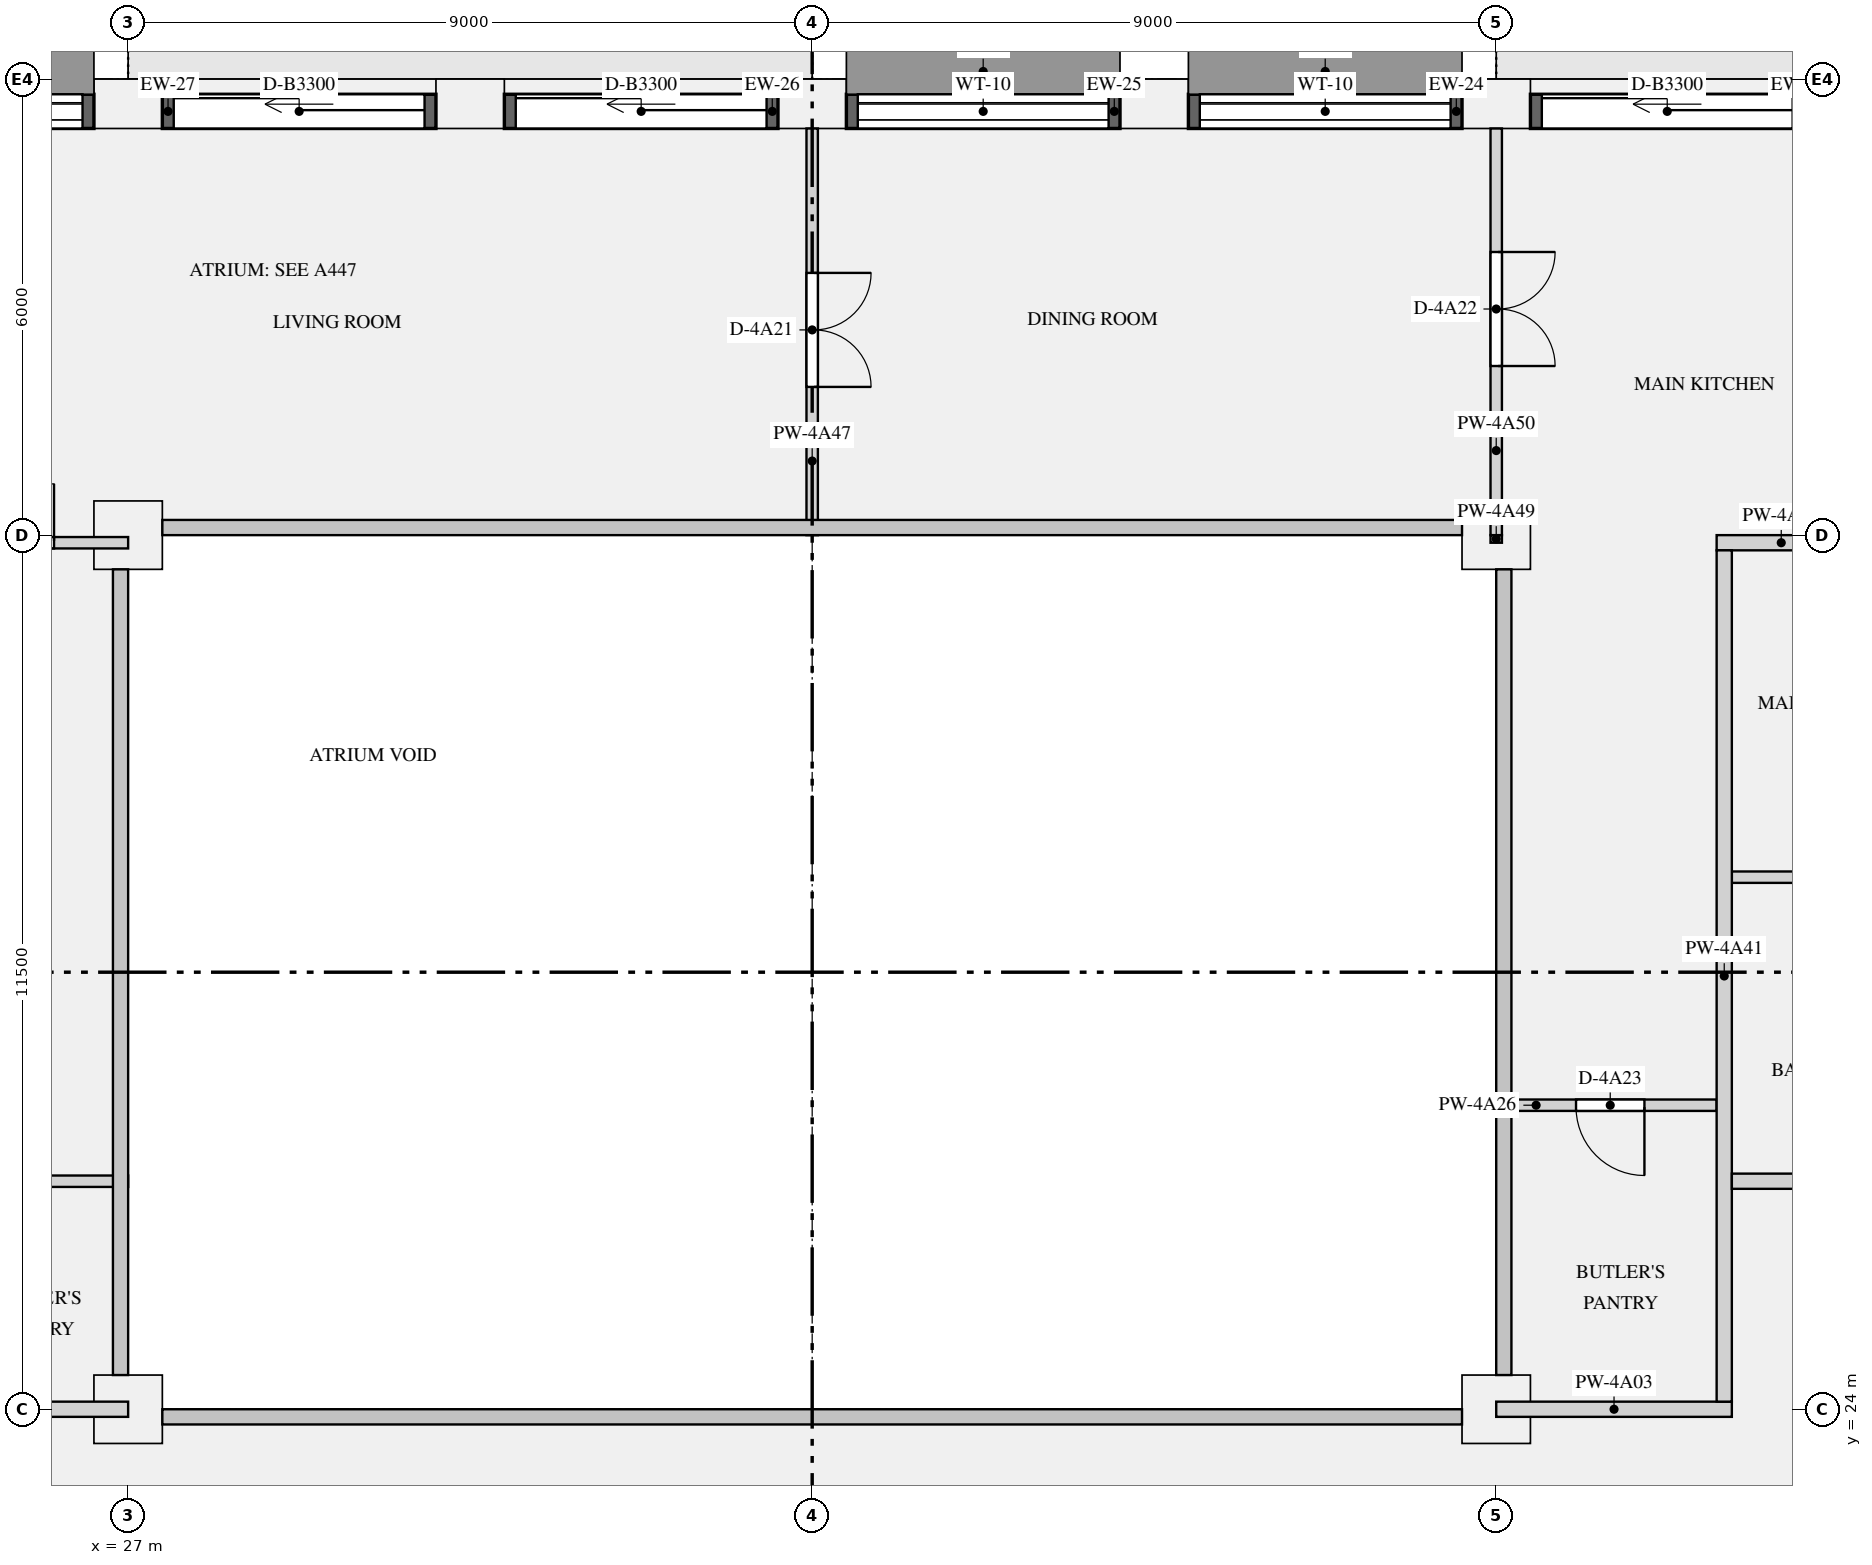
"""IFC4 building model, lengths in metres.
Left out: names, types, materials, properties, quantities, classifications, styles, units other than length and angle.
Written with IfcOpenShell. Run it as: python <this file> out.ifc"""

import sys

from ifc_helpers import new_model, si_unit, direction, frame, frame_2d, origin, origin_2d, place, context, subcontext, project, spatial, rectangle, extrude, element, fill, save


model = new_model("IFC4")
c1 = context("Model", 3, precision=1e-05, world=origin(), true_north=direction((0.0, 1.0)))
c2 = subcontext(c1, "Body", "Model", "MODEL_VIEW")
j1 = project(units=[si_unit("LENGTHUNIT", "METRE"), si_unit("PLANEANGLEUNIT", "RADIAN")], contexts=[c1])
p1 = place(None, origin())
s1 = spatial("IfcSite", under=j1, at=p1, CompositionType="ELEMENT")
p2 = place(p1, origin())
s2 = spatial("IfcBuilding", under=s1, at=p2, CompositionType="ELEMENT")
p3 = place(p2, frame((0.0, 0.0, 198.0)))
s3 = spatial("IfcBuildingStorey", under=s2, at=p3, CompositionType="ELEMENT", Elevation=198.0)
for number, where, z_axis, x_axis in (
    (1, (45.0, 41.175, 0.0), (0.0, 0.0, 1.0), (-1.0, 0.0, 0.0)),
    (2, (40.5, 41.175, 0.0), (0.0, 0.0, 1.0), (-1.0, 0.0, 0.0)),
    (3, (36.0, 41.175, 0.0), (0.0, 0.0, 1.0), (-1.0, 0.0, 0.0)),
    (4, (31.5, 41.175, 0.0), (0.0, 0.0, 1.0), (-1.0, 0.0, 0.0)),
    (5, (27.0, 41.175, 0.0), (0.0, 0.0, 1.0), (-1.0, 0.0, 0.0)),
):
    element("IfcColumn", number, at=place(p3, frame(where, z_axis=z_axis, x_axis=x_axis)), inside=s3, PredefinedType="USERDEFINED", context=c2, shape_type="SweptSolid", body=[
        extrude(rectangle(XDim=0.9, YDim=0.65, at=origin_2d()), origin(), (0.0, 0.0, 1.0), 3.15),
    ])
for number, where, z_axis, x_axis in (
    (6, (27.0, 24.0, 0.0), (0.0, 0.0, 1.0), (1.0, 0.0, 0.0)),
    (7, (45.0, 24.0, 0.0), (0.0, 0.0, 1.0), (1.0, 0.0, 0.0)),
    (8, (27.0, 35.5, 0.0), (0.0, 0.0, 1.0), (1.0, 0.0, 0.0)),
    (9, (45.0, 35.5, 0.0), (0.0, 0.0, 1.0), (1.0, 0.0, 0.0)),
):
    element("IfcColumn", number, at=place(p3, frame(where, z_axis=z_axis, x_axis=x_axis)), inside=s3, PredefinedType="COLUMN", context=c2, shape_type="SweptSolid", body=[
        extrude(rectangle(XDim=0.9, YDim=0.9, at=origin_2d()), origin(), (0.0, 0.0, 1.0), 3.15),
    ])
p4 = place(p3, frame((49.05, 41.075, 0.0), z_axis=(0.0, 0.0, 1.0), x_axis=(-1.0, 0.0, 0.0)))
e10 = element("IfcWall", 10, at=p4, inside=s3, PredefinedType="SOLIDWALL", context=c2, shape_type="SweptSolid", body=[
    extrude(rectangle(XDim=3.6, YDim=0.45, at=frame_2d((1.8, 0.0))), origin(), (0.0, 0.0, 1.0), 2.83),
])
p5 = place(p4, frame((0.15, 0.0, 0.0)))
e11 = element("IfcOpeningElement", 11, at=p5, cuts=e10, PredefinedType="OPENING", context=c2, shape_type="SweptSolid", body=[
    extrude(rectangle(XDim=3.3, YDim=2.3, at=frame_2d((1.65, 1.15))), frame((0.0, 0.235, 0.0), z_axis=(0.0, -1.0, 0.0), x_axis=(1.0, 0.0, 0.0)), (0.0, 0.0, 1.0), 0.47),
])
p6 = place(p3, frame((44.55, 41.075, 0.9), z_axis=(0.0, 0.0, 1.0), x_axis=(-1.0, 0.0, 0.0)))
e12 = element("IfcWall", 12, at=p6, inside=s3, PredefinedType="SOLIDWALL", context=c2, shape_type="SweptSolid", body=[
    extrude(rectangle(XDim=3.6, YDim=0.45, at=frame_2d((1.8, 0.0))), origin(), (0.0, 0.0, 1.0), 1.93),
])
p7 = place(p6, frame((0.15, 0.0, 0.15)))
e13 = element("IfcOpeningElement", 13, at=p7, cuts=e12, PredefinedType="OPENING", context=c2, shape_type="SweptSolid", body=[
    extrude(rectangle(XDim=3.3, YDim=1.5, at=frame_2d((1.65, 0.75))), frame((0.0, 0.235, 0.0), z_axis=(0.0, -1.0, 0.0), x_axis=(1.0, 0.0, 0.0)), (0.0, 0.0, 1.0), 0.47),
])
p8 = place(p3, frame((40.05, 41.075, 0.9), z_axis=(0.0, 0.0, 1.0), x_axis=(-1.0, 0.0, 0.0)))
e14 = element("IfcWall", 14, at=p8, inside=s3, PredefinedType="SOLIDWALL", context=c2, shape_type="SweptSolid", body=[
    extrude(rectangle(XDim=3.6, YDim=0.45, at=frame_2d((1.8, 0.0))), origin(), (0.0, 0.0, 1.0), 1.93),
])
p9 = place(p8, frame((0.15, 0.0, 0.15)))
e15 = element("IfcOpeningElement", 15, at=p9, cuts=e14, PredefinedType="OPENING", context=c2, shape_type="SweptSolid", body=[
    extrude(rectangle(XDim=3.3, YDim=1.5, at=frame_2d((1.65, 0.75))), frame((0.0, 0.235, 0.0), z_axis=(0.0, -1.0, 0.0), x_axis=(1.0, 0.0, 0.0)), (0.0, 0.0, 1.0), 0.47),
])
p10 = place(p3, frame((35.55, 41.075, 0.0), z_axis=(0.0, 0.0, 1.0), x_axis=(-1.0, 0.0, 0.0)))
e16 = element("IfcWall", 16, at=p10, inside=s3, PredefinedType="SOLIDWALL", context=c2, shape_type="SweptSolid", body=[
    extrude(rectangle(XDim=3.6, YDim=0.45, at=frame_2d((1.8, 0.0))), origin(), (0.0, 0.0, 1.0), 2.83),
])
p11 = place(p10, frame((0.15, 0.0, 0.0)))
e17 = element("IfcOpeningElement", 17, at=p11, cuts=e16, PredefinedType="OPENING", context=c2, shape_type="SweptSolid", body=[
    extrude(rectangle(XDim=3.3, YDim=2.3, at=frame_2d((1.65, 1.15))), frame((0.0, 0.235, 0.0), z_axis=(0.0, -1.0, 0.0), x_axis=(1.0, 0.0, 0.0)), (0.0, 0.0, 1.0), 0.47),
])
p12 = place(p3, frame((31.05, 41.075, 0.0), z_axis=(0.0, 0.0, 1.0), x_axis=(-1.0, 0.0, 0.0)))
e18 = element("IfcWall", 18, at=p12, inside=s3, PredefinedType="SOLIDWALL", context=c2, shape_type="SweptSolid", body=[
    extrude(rectangle(XDim=3.6, YDim=0.45, at=frame_2d((1.8, 0.0))), origin(), (0.0, 0.0, 1.0), 2.83),
])
p13 = place(p12, frame((0.15, 0.0, 0.0)))
e19 = element("IfcOpeningElement", 19, at=p13, cuts=e18, PredefinedType="OPENING", context=c2, shape_type="SweptSolid", body=[
    extrude(rectangle(XDim=3.3, YDim=2.3, at=frame_2d((1.65, 1.15))), frame((0.0, 0.235, 0.0), z_axis=(0.0, -1.0, 0.0), x_axis=(1.0, 0.0, 0.0)), (0.0, 0.0, 1.0), 0.47),
])
p14 = place(p3, frame((26.55, 41.075, 0.9), z_axis=(0.0, 0.0, 1.0), x_axis=(-1.0, 0.0, 0.0)))
e20 = element("IfcWall", 20, at=p14, inside=s3, PredefinedType="SOLIDWALL", context=c2, shape_type="SweptSolid", body=[
    extrude(rectangle(XDim=3.6, YDim=0.45, at=frame_2d((1.8, 0.0))), origin(), (0.0, 0.0, 1.0), 1.93),
])
p15 = place(p14, frame((0.15, 0.0, 0.15)))
e21 = element("IfcOpeningElement", 21, at=p15, cuts=e20, PredefinedType="OPENING", context=c2, shape_type="SweptSolid", body=[
    extrude(rectangle(XDim=3.3, YDim=1.5, at=frame_2d((1.65, 0.75))), frame((0.0, 0.235, 0.0), z_axis=(0.0, -1.0, 0.0), x_axis=(1.0, 0.0, 0.0)), (0.0, 0.0, 1.0), 0.47),
])
for number, where, z_axis, x_axis in (
    (22, (23.9, 24.0, 0.0), (0.0, 0.0, 1.0), (1.0, 0.0, 0.0)),
    (23, (45.0, 24.0, 0.0), (0.0, 0.0, 1.0), (1.0, 0.0, 0.0)),
):
    element("IfcWall", number, at=place(p3, frame(where, z_axis=z_axis, x_axis=x_axis)), inside=s3, PredefinedType="PARTITIONING", context=c2, shape_type="SweptSolid", body=[
        extrude(rectangle(XDim=3.1, YDim=0.2, at=frame_2d((1.55, 0.0))), origin(), (0.0, 0.0, 1.0), 2.83),
    ])
p16 = place(p3, frame((23.925, 27.0, 0.0), z_axis=(0.0, 0.0, 1.0), x_axis=(1.0, 0.0, 0.0)))
e24 = element("IfcWall", 24, at=p16, inside=s3, PredefinedType="PARTITIONING", context=c2, shape_type="SweptSolid", body=[
    extrude(rectangle(XDim=3.075, YDim=0.15, at=frame_2d((1.538, 0.0))), origin(), (0.0, 0.0, 1.0), 2.83),
])
p17 = place(p16, frame((1.125, 0.0, 0.0)))
e25 = element("IfcOpeningElement", 25, at=p17, cuts=e24, PredefinedType="OPENING", context=c2, shape_type="SweptSolid", body=[
    extrude(rectangle(XDim=0.9, YDim=2.1, at=frame_2d((0.45, 1.05))), frame((0.0, 0.085, 0.0), z_axis=(0.0, -1.0, 0.0), x_axis=(1.0, 0.0, 0.0)), (0.0, 0.0, 1.0), 0.17),
])
p18 = place(p3, frame((48.1, 27.0, 0.0), z_axis=(0.0, 0.0, 1.0), x_axis=(1.0, 0.0, 0.0)))
e26 = element("IfcWall", 26, at=p18, inside=s3, PredefinedType="PARTITIONING", context=c2, shape_type="SweptSolid", body=[
    extrude(rectangle(XDim=6.8, YDim=0.2, at=frame_2d((3.4, 0.0))), origin(), (0.0, 0.0, 1.0), 2.83),
])
p19 = place(p18, frame((4.85, 0.0, 0.0)))
e27 = element("IfcOpeningElement", 27, at=p19, cuts=e26, PredefinedType="OPENING", context=c2, shape_type="SweptSolid", body=[
    extrude(rectangle(XDim=1.1, YDim=2.1, at=frame_2d((0.55, 1.05))), frame((0.0, 0.11, 0.0), z_axis=(0.0, -1.0, 0.0), x_axis=(1.0, 0.0, 0.0)), (0.0, 0.0, 1.0), 0.22),
])
p20 = place(p3, frame((15.8, 35.4, 0.0), z_axis=(0.0, 0.0, 1.0), x_axis=(1.0, 0.0, 0.0)))
e28 = element("IfcWall", 28, at=p20, inside=s3, PredefinedType="PARTITIONING", context=c2, shape_type="SweptSolid", body=[
    extrude(rectangle(XDim=11.2, YDim=0.15, at=frame_2d((5.6, 0.0))), origin(), (0.0, 0.0, 1.0), 2.83),
])
p21 = place(p20, frame((0.425, 0.0, 0.0)))
e29 = element("IfcOpeningElement", 29, at=p21, cuts=e28, PredefinedType="OPENING", context=c2, shape_type="SweptSolid", body=[
    extrude(rectangle(XDim=0.9, YDim=2.1, at=frame_2d((0.45, 1.05))), frame((0.0, 0.085, 0.0), z_axis=(0.0, -1.0, 0.0), x_axis=(1.0, 0.0, 0.0)), (0.0, 0.0, 1.0), 0.17),
])
p22 = place(p20, frame((4.225, 0.0, 0.0)))
e30 = element("IfcOpeningElement", 30, at=p22, cuts=e28, PredefinedType="OPENING", context=c2, shape_type="SweptSolid", body=[
    extrude(rectangle(XDim=0.9, YDim=2.1, at=frame_2d((0.45, 1.05))), frame((0.0, 0.085, 0.0), z_axis=(0.0, -1.0, 0.0), x_axis=(1.0, 0.0, 0.0)), (0.0, 0.0, 1.0), 0.17),
])
p23 = place(p20, frame((8.725, 0.0, 0.0)))
e31 = element("IfcOpeningElement", 31, at=p23, cuts=e28, PredefinedType="OPENING", context=c2, shape_type="SweptSolid", body=[
    extrude(rectangle(XDim=1.5, YDim=2.1, at=frame_2d((0.75, 1.05))), frame((0.0, 0.085, 0.0), z_axis=(0.0, -1.0, 0.0), x_axis=(1.0, 0.0, 0.0)), (0.0, 0.0, 1.0), 0.17),
])
p24 = place(p3, frame((47.9, 35.4, 0.0), z_axis=(0.0, 0.0, 1.0), x_axis=(1.0, 0.0, 0.0)))
e32 = element("IfcWall", 32, at=p24, inside=s3, PredefinedType="PARTITIONING", context=c2, shape_type="SweptSolid", body=[
    extrude(rectangle(XDim=1.7, YDim=0.2, at=frame_2d((0.85, 0.0))), origin(), (0.0, 0.0, 1.0), 2.83),
])
p25 = place(p3, frame((45.0, 28.0, 0.0), z_axis=(0.0, 0.0, 1.0), x_axis=(1.0, 0.0, 0.0)))
e33 = element("IfcWall", 33, at=p25, inside=s3, PredefinedType="PARTITIONING", context=c2, shape_type="SweptSolid", body=[
    extrude(rectangle(XDim=2.9, YDim=0.15, at=frame_2d((1.45, 0.0))), origin(), (0.0, 0.0, 1.0), 2.83),
])
p26 = place(p25, frame((1.05, 0.0, 0.0)))
e34 = element("IfcOpeningElement", 34, at=p26, cuts=e33, PredefinedType="OPENING", context=c2, shape_type="SweptSolid", body=[
    extrude(rectangle(XDim=0.9, YDim=2.1, at=frame_2d((0.45, 1.05))), frame((0.0, 0.085, 0.0), z_axis=(0.0, -1.0, 0.0), x_axis=(1.0, 0.0, 0.0)), (0.0, 0.0, 1.0), 0.17),
])
p27 = place(p3, frame((48.1, 31.0, 0.0), z_axis=(0.0, 0.0, 1.0), x_axis=(1.0, 0.0, 0.0)))
e35 = element("IfcWall", 35, at=p27, inside=s3, PredefinedType="PARTITIONING", context=c2, shape_type="SweptSolid", body=[
    extrude(rectangle(XDim=3.325, YDim=0.15, at=frame_2d((1.663, 0.0))), origin(), (0.0, 0.0, 1.0), 2.83),
])
p28 = place(p3, frame((48.0, 24.1, 0.0), z_axis=(0.0, 0.0, 1.0), x_axis=(0.0, 1.0, 0.0)))
e36 = element("IfcWall", 36, at=p28, inside=s3, PredefinedType="PARTITIONING", context=c2, shape_type="SweptSolid", body=[
    extrude(rectangle(XDim=11.2, YDim=0.2, at=frame_2d((5.6, 0.0))), origin(), (0.0, 0.0, 1.0), 2.83),
])
p29 = place(p3, frame((36.0, 35.5, 0.0), z_axis=(0.0, 0.0, 1.0), x_axis=(0.0, 1.0, 0.0)))
e37 = element("IfcWall", 37, at=p29, inside=s3, PredefinedType="PARTITIONING", context=c2, shape_type="SweptSolid", body=[
    extrude(rectangle(XDim=5.35, YDim=0.15, at=frame_2d((2.675, 0.0))), origin(), (0.0, 0.0, 1.0), 2.83),
])
p30 = place(p29, frame((1.95, 0.0, 0.0)))
e38 = element("IfcOpeningElement", 38, at=p30, cuts=e37, PredefinedType="OPENING", context=c2, shape_type="SweptSolid", body=[
    extrude(rectangle(XDim=1.5, YDim=2.1, at=frame_2d((0.75, 1.05))), frame((0.0, 0.085, 0.0), z_axis=(0.0, -1.0, 0.0), x_axis=(1.0, 0.0, 0.0)), (0.0, 0.0, 1.0), 0.17),
])
p31 = place(p3, frame((45.0, 35.4, 0.0), z_axis=(0.0, 0.0, 1.0), x_axis=(0.0, 1.0, 0.0)))
e39 = element("IfcWall", 39, at=p31, inside=s3, PredefinedType="PARTITIONING", context=c2, shape_type="SweptSolid", body=[
    extrude(rectangle(XDim=0.1, YDim=0.15, at=frame_2d((0.05, 0.0))), origin(), (0.0, 0.0, 1.0), 2.83),
])
p32 = place(p3, frame((45.0, 35.5, 0.0), z_axis=(0.0, 0.0, 1.0), x_axis=(0.0, 1.0, 0.0)))
e40 = element("IfcWall", 40, at=p32, inside=s3, PredefinedType="PARTITIONING", context=c2, shape_type="SweptSolid", body=[
    extrude(rectangle(XDim=5.35, YDim=0.15, at=frame_2d((2.675, 0.0))), origin(), (0.0, 0.0, 1.0), 2.83),
])
p33 = place(p32, frame((2.225, 0.0, 0.0)))
e41 = element("IfcOpeningElement", 41, at=p33, cuts=e40, PredefinedType="OPENING", context=c2, shape_type="SweptSolid", body=[
    extrude(rectangle(XDim=1.5, YDim=2.1, at=frame_2d((0.75, 1.05))), frame((0.0, 0.085, 0.0), z_axis=(0.0, -1.0, 0.0), x_axis=(1.0, 0.0, 0.0)), (0.0, 0.0, 1.0), 0.17),
])
p34 = place(p5, origin())
e42 = element("IfcDoor", 42, at=p34, inside=s3, OperationType="SLIDING_TO_LEFT", PredefinedType="DOOR", context=c2, shape_type="SweptSolid", body=[
    extrude(rectangle(XDim=3.3, YDim=2.3, at=frame_2d((1.65, 1.15))), frame((0.0, -0.07, 0.0), z_axis=(0.0, -1.0, 0.0), x_axis=(1.0, 0.0, 0.0)), (0.0, 0.0, 1.0), 0.05),
])
fill(e11, e42)
p35 = place(p7, origin())
e43 = element("IfcWindow", 43, at=p35, inside=s3, PartitioningType="SINGLE_PANEL", PredefinedType="WINDOW", context=c2, shape_type="SweptSolid", body=[
    extrude(rectangle(XDim=3.3, YDim=1.5, at=frame_2d((1.65, 0.75))), frame((0.0, -0.065, 0.0), z_axis=(0.0, -1.0, 0.0), x_axis=(1.0, 0.0, 0.0)), (0.0, 0.0, 1.0), 0.06),
])
fill(e13, e43)
p36 = place(p9, origin())
e44 = element("IfcWindow", 44, at=p36, inside=s3, PartitioningType="SINGLE_PANEL", PredefinedType="WINDOW", context=c2, shape_type="SweptSolid", body=[
    extrude(rectangle(XDim=3.3, YDim=1.5, at=frame_2d((1.65, 0.75))), frame((0.0, -0.065, 0.0), z_axis=(0.0, -1.0, 0.0), x_axis=(1.0, 0.0, 0.0)), (0.0, 0.0, 1.0), 0.06),
])
fill(e15, e44)
p37 = place(p11, origin())
e45 = element("IfcDoor", 45, at=p37, inside=s3, OperationType="SLIDING_TO_LEFT", PredefinedType="DOOR", context=c2, shape_type="SweptSolid", body=[
    extrude(rectangle(XDim=3.3, YDim=2.3, at=frame_2d((1.65, 1.15))), frame((0.0, -0.07, 0.0), z_axis=(0.0, -1.0, 0.0), x_axis=(1.0, 0.0, 0.0)), (0.0, 0.0, 1.0), 0.05),
])
fill(e17, e45)
p38 = place(p13, origin())
e46 = element("IfcDoor", 46, at=p38, inside=s3, OperationType="SLIDING_TO_LEFT", PredefinedType="DOOR", context=c2, shape_type="SweptSolid", body=[
    extrude(rectangle(XDim=3.3, YDim=2.3, at=frame_2d((1.65, 1.15))), frame((0.0, -0.07, 0.0), z_axis=(0.0, -1.0, 0.0), x_axis=(1.0, 0.0, 0.0)), (0.0, 0.0, 1.0), 0.05),
])
fill(e19, e46)
p39 = place(p15, origin())
e47 = element("IfcWindow", 47, at=p39, inside=s3, PartitioningType="SINGLE_PANEL", PredefinedType="WINDOW", context=c2, shape_type="SweptSolid", body=[
    extrude(rectangle(XDim=3.3, YDim=1.5, at=frame_2d((1.65, 0.75))), frame((0.0, -0.065, 0.0), z_axis=(0.0, -1.0, 0.0), x_axis=(1.0, 0.0, 0.0)), (0.0, 0.0, 1.0), 0.06),
])
fill(e21, e47)
p40 = place(p23, origin())
e48 = element("IfcDoor", 48, at=p40, inside=s3, OperationType="DOUBLE_DOOR_SINGLE_SWING", PredefinedType="DOOR", context=c2, shape_type="SweptSolid", body=[
    extrude(rectangle(XDim=1.5, YDim=2.1, at=frame_2d((0.75, 1.05))), frame((0.0, 0.025, 0.0), z_axis=(0.0, -1.0, 0.0), x_axis=(1.0, 0.0, 0.0)), (0.0, 0.0, 1.0), 0.05),
])
fill(e31, e48)
p41 = place(p30, frame((1.5, 0.0, 0.0), z_axis=(0.0, 0.0, 1.0), x_axis=(-1.0, 0.0, 0.0)))
e49 = element("IfcDoor", 49, at=p41, inside=s3, OperationType="DOUBLE_DOOR_SINGLE_SWING", PredefinedType="DOOR", context=c2, shape_type="SweptSolid", body=[
    extrude(rectangle(XDim=1.5, YDim=2.1, at=frame_2d((0.75, 1.05))), frame((0.0, 0.025, 0.0), z_axis=(0.0, -1.0, 0.0), x_axis=(1.0, 0.0, 0.0)), (0.0, 0.0, 1.0), 0.05),
])
fill(e38, e49)
p42 = place(p33, frame((1.5, 0.0, 0.0), z_axis=(0.0, 0.0, 1.0), x_axis=(-1.0, 0.0, 0.0)))
e50 = element("IfcDoor", 50, at=p42, inside=s3, OperationType="DOUBLE_DOOR_SINGLE_SWING", PredefinedType="DOOR", context=c2, shape_type="SweptSolid", body=[
    extrude(rectangle(XDim=1.5, YDim=2.1, at=frame_2d((0.75, 1.05))), frame((0.0, 0.025, 0.0), z_axis=(0.0, -1.0, 0.0), x_axis=(1.0, 0.0, 0.0)), (0.0, 0.0, 1.0), 0.05),
])
fill(e41, e50)
p43 = place(p26, frame((0.9, 0.0, 0.0), z_axis=(0.0, 0.0, 1.0), x_axis=(-1.0, 0.0, 0.0)))
e51 = element("IfcDoor", 51, at=p43, inside=s3, OperationType="SINGLE_SWING_LEFT", PredefinedType="DOOR", context=c2, shape_type="SweptSolid", body=[
    extrude(rectangle(XDim=0.9, YDim=2.1, at=frame_2d((0.45, 1.05))), frame((0.0, 0.025, 0.0), z_axis=(0.0, -1.0, 0.0), x_axis=(1.0, 0.0, 0.0)), (0.0, 0.0, 1.0), 0.05),
])
fill(e34, e51)
save(model, sys.argv[1])
